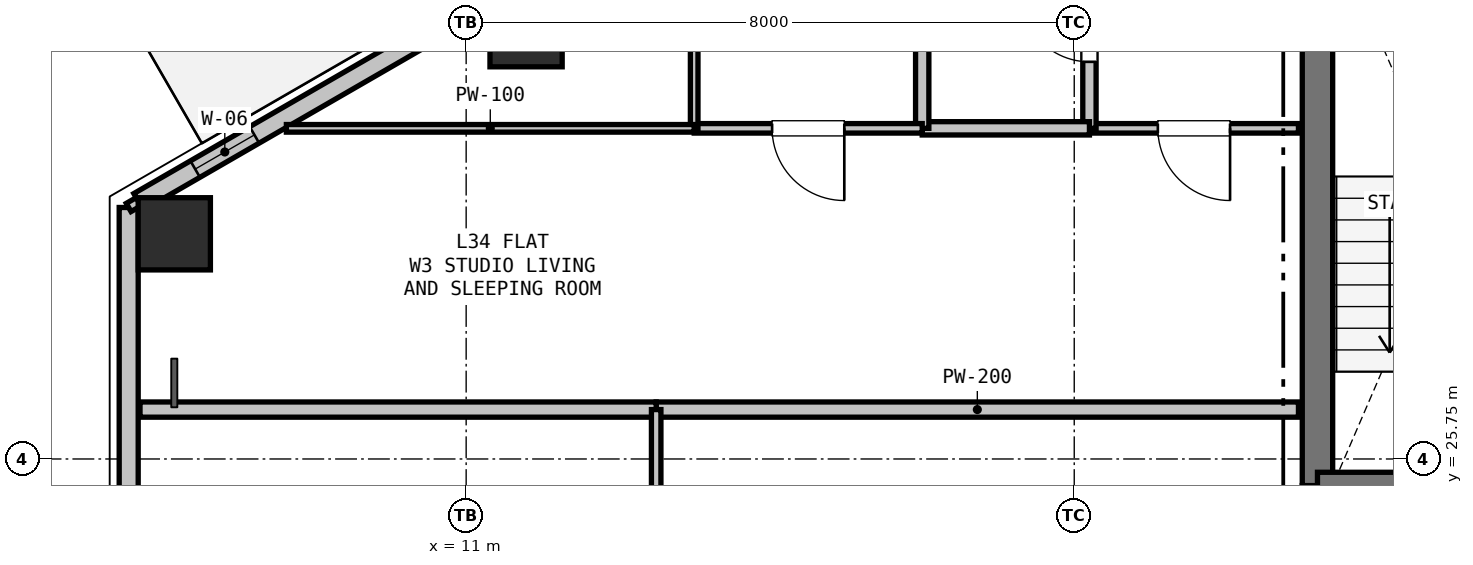
"""IFC4 building model, lengths in metres.
Left out: names, types, materials, properties, quantities, classifications, styles, units other than length and angle.
Written with IfcOpenShell. Run it as: python <this file> out.ifc"""

import sys

from ifc_helpers import new_model, si_unit, direction, frame, frame_2d, origin, origin_2d, place, context, subcontext, project, spatial, rectangle, hollow_rectangle, extrude, element, fill, save


model = new_model("IFC4")
c1 = context("Model", 3, precision=1e-05, world=origin(), true_north=direction((0.0, 1.0)))
c2 = subcontext(c1, "Body", "Model", "MODEL_VIEW")
j1 = project(units=[si_unit("LENGTHUNIT", "METRE"), si_unit("PLANEANGLEUNIT", "RADIAN")], contexts=[c1])
p1 = place(None, origin())
s1 = spatial("IfcSite", under=j1, at=p1, CompositionType="ELEMENT")
p2 = place(p1, origin())
s2 = spatial("IfcBuilding", under=s1, at=p2, CompositionType="ELEMENT")
p3 = place(p2, frame((0.0, 0.0, 124.5)))
s3 = spatial("IfcBuildingStorey", under=s2, at=p3, CompositionType="ELEMENT", Elevation=124.5)
for number, where, z_axis, x_axis in (
    (1, (7.16, 28.712, 0.0), (0.0, 0.0, 1.0), (1.0, 0.0, 0.0)),
    (2, (11.788, 31.384, 0.0), (0.0, 0.0, 1.0), (1.0, 0.0, 0.0)),
):
    element("IfcColumn", number, at=place(p3, frame(where, z_axis=z_axis, x_axis=x_axis)), inside=s3, PredefinedType="COLUMN", context=c2, shape_type="SweptSolid", body=[
        extrude(hollow_rectangle(XDim=0.95, YDim=0.95, WallThickness=0.028, at=origin_2d()), origin(), (0.0, 0.0, 1.0), 3.3),
    ])
p4 = place(p3, frame((6.56, 24.441, 0.0), z_axis=(0.0, 0.0, 1.0), x_axis=(0.0, 1.0, 0.0)))
e3 = element("IfcWall", 3, at=p4, inside=s3, PredefinedType="SOLIDWALL", context=c2, shape_type="SweptSolid", body=[
    extrude(rectangle(XDim=4.617, YDim=0.25, at=frame_2d((2.309, 0.0))), origin(), (0.0, 0.0, 1.0), 2.68),
])
p5 = place(p3, frame((6.69, 29.134, 0.0), z_axis=(0.0, 0.0, 1.0), x_axis=(0.866027848477, 0.499995765644, 0.0)))
e4 = element("IfcWall", 4, at=p5, inside=s3, PredefinedType="SOLIDWALL", context=c2, shape_type="SweptSolid", body=[
    extrude(rectangle(XDim=11.186, YDim=0.25, at=frame_2d((5.593, 0.0))), origin(), (0.0, 0.0, 1.0), 2.68),
])
p6 = place(p5, frame((9.122, 0.0, 0.0)))
e5 = element("IfcOpeningElement", 5, at=p6, cuts=e4, PredefinedType="OPENING", context=c2, shape_type="SweptSolid", body=[
    extrude(rectangle(XDim=1.0, YDim=2.1, at=frame_2d((0.5, 1.05))), frame((0.0, 0.135, 0.0), z_axis=(0.0, -1.0, 0.0), x_axis=(1.0, 0.0, 0.0)), (0.0, 0.0, 1.0), 0.27),
])
p7 = place(p5, frame((0.86, 0.0, 0.9)))
e6 = element("IfcOpeningElement", 6, at=p7, cuts=e4, PredefinedType="OPENING", context=c2, shape_type="SweptSolid", body=[
    extrude(rectangle(XDim=0.9, YDim=1.4, at=frame_2d((0.45, 0.7))), frame((0.0, 0.135, 0.0), z_axis=(0.0, -1.0, 0.0), x_axis=(1.0, 0.0, 0.0)), (0.0, 0.0, 1.0), 0.27),
])
p8 = place(p3, frame((22.2, 25.4, 0.0), z_axis=(0.0, 0.0, 1.0), x_axis=(0.0, 1.0, 0.0)))
e7 = element("IfcWall", 7, at=p8, inside=s3, PredefinedType="SHEAR", context=c2, shape_type="SweptSolid", body=[
    extrude(rectangle(XDim=7.35, YDim=0.4, at=frame_2d((3.675, 0.0))), origin(), (0.0, 0.0, 1.0), 3.06),
])
p9 = place(p3, frame((22.2, 25.4, 0.0), z_axis=(0.0, 0.0, 1.0), x_axis=(1.0, 0.0, 0.0)))
e8 = element("IfcWall", 8, at=p9, inside=s3, PredefinedType="SHEAR", context=c2, shape_type="SweptSolid", body=[
    extrude(rectangle(XDim=3.45, YDim=0.35, at=frame_2d((1.725, 0.0))), origin(), (0.0, 0.0, 1.0), 3.06),
])
p10 = place(p9, frame((1.15, 0.0, 0.0)))
e9 = element("IfcOpeningElement", 9, at=p10, cuts=e8, PredefinedType="OPENING", context=c2, shape_type="SweptSolid", body=[
    extrude(rectangle(XDim=1.15, YDim=2.15, at=frame_2d((0.575, 1.075))), frame((0.0, 0.185, 0.0), z_axis=(0.0, -1.0, 0.0), x_axis=(1.0, 0.0, 0.0)), (0.0, 0.0, 1.0), 0.37),
])
p11 = place(p3, frame((21.95, 30.1, 0.0), z_axis=(0.0, 0.0, 1.0), x_axis=(-1.0, 0.0, 0.0)))
e10 = element("IfcWall", 10, at=p11, inside=s3, PredefinedType="PARTITIONING", context=c2, shape_type="SweptSolid", body=[
    extrude(rectangle(XDim=2.75, YDim=0.125, at=frame_2d((1.375, 0.0))), origin(), (0.0, 0.0, 1.0), 2.508),
])
p12 = place(p11, frame((0.9, 0.0, 0.0)))
e11 = element("IfcOpeningElement", 11, at=p12, cuts=e10, PredefinedType="OPENING", context=c2, shape_type="SweptSolid", body=[
    extrude(rectangle(XDim=0.95, YDim=2.1, at=frame_2d((0.475, 1.05))), frame((0.0, 0.073, 0.0), z_axis=(0.0, -1.0, 0.0), x_axis=(1.0, 0.0, 0.0)), (0.0, 0.0, 1.0), 0.145),
])
p13 = place(p3, frame((19.2, 30.1, 0.0), z_axis=(0.0, 0.0, 1.0), x_axis=(0.0, 1.0, 0.0)))
e12 = element("IfcWall", 12, at=p13, inside=s3, PredefinedType="PLUMBINGWALL", context=c2, shape_type="SweptSolid", body=[
    extrude(rectangle(XDim=2.65, YDim=0.175, at=frame_2d((1.325, 0.0))), origin(), (0.0, 0.0, 1.0), 2.433),
])
p14 = place(p13, frame((0.875, 0.0, 0.0)))
e13 = element("IfcOpeningElement", 13, at=p14, cuts=e12, PredefinedType="OPENING", context=c2, shape_type="SweptSolid", body=[
    extrude(rectangle(XDim=0.9, YDim=2.1, at=frame_2d((0.45, 1.05))), frame((0.0, 0.097, 0.0), z_axis=(0.0, -1.0, 0.0), x_axis=(1.0, 0.0, 0.0)), (0.0, 0.0, 1.0), 0.195),
])
p15 = place(p3, frame((19.2, 30.1, 0.0), z_axis=(0.0, 0.0, 1.0), x_axis=(-1.0, 0.0, 0.0)))
e14 = element("IfcWall", 14, at=p15, inside=s3, PredefinedType="PLUMBINGWALL", context=c2, shape_type="SweptSolid", body=[
    extrude(rectangle(XDim=2.2, YDim=0.175, at=frame_2d((1.1, 0.0))), origin(), (0.0, 0.0, 1.0), 3.06),
])
p16 = place(p3, frame((17.0, 30.1, 0.0), z_axis=(0.0, 0.0, 1.0), x_axis=(0.0, 1.0, 0.0)))
e15 = element("IfcWall", 15, at=p16, inside=s3, PredefinedType="PLUMBINGWALL", context=c2, shape_type="SweptSolid", body=[
    extrude(rectangle(XDim=2.65, YDim=0.175, at=frame_2d((1.325, 0.0))), origin(), (0.0, 0.0, 1.0), 2.433),
])
p17 = place(p3, frame((17.0, 30.1, 0.0), z_axis=(0.0, 0.0, 1.0), x_axis=(-1.0, 0.0, 0.0)))
e16 = element("IfcWall", 16, at=p17, inside=s3, PredefinedType="PARTITIONING", context=c2, shape_type="SweptSolid", body=[
    extrude(rectangle(XDim=3.0, YDim=0.125, at=frame_2d((1.5, 0.0))), origin(), (0.0, 0.0, 1.0), 3.06),
])
p18 = place(p17, frame((1.025, 0.0, 0.0)))
e17 = element("IfcOpeningElement", 17, at=p18, cuts=e16, PredefinedType="OPENING", context=c2, shape_type="SweptSolid", body=[
    extrude(rectangle(XDim=0.95, YDim=2.1, at=frame_2d((0.475, 1.05))), frame((0.0, 0.073, 0.0), z_axis=(0.0, -1.0, 0.0), x_axis=(1.0, 0.0, 0.0)), (0.0, 0.0, 1.0), 0.145),
])
p19 = place(p3, frame((14.0, 30.1, 0.0), z_axis=(0.0, 0.0, 1.0), x_axis=(0.0, 1.0, 0.0)))
e18 = element("IfcWall", 18, at=p19, inside=s3, PredefinedType="PARTITIONING", context=c2, shape_type="SweptSolid", body=[
    extrude(rectangle(XDim=3.082, YDim=0.1, at=frame_2d((1.541, 0.0))), origin(), (0.0, 0.0, 1.0), 2.365),
])
p20 = place(p3, frame((8.635, 30.1, 0.0), z_axis=(0.0, 0.0, 1.0), x_axis=(1.0, 0.0, 0.0)))
e19 = element("IfcWall", 19, at=p20, inside=s3, PredefinedType="PARTITIONING", context=c2, shape_type="SweptSolid", body=[
    extrude(rectangle(XDim=5.365, YDim=0.1, at=frame_2d((2.683, 0.0))), origin(), (0.0, 0.0, 1.0), 2.725),
])
p21 = place(p3, frame((21.95, 26.4, 0.0), z_axis=(0.0, 0.0, 1.0), x_axis=(-1.0, 0.0, 0.0)))
e20 = element("IfcWall", 20, at=p21, inside=s3, PredefinedType="PARTITIONING", context=c2, shape_type="SweptSolid", body=[
    extrude(rectangle(XDim=8.45, YDim=0.2, at=frame_2d((4.225, 0.0))), origin(), (0.0, 0.0, 1.0), 2.508),
])
p22 = place(p3, frame((13.5, 26.4, 0.0), z_axis=(0.0, 0.0, 1.0), x_axis=(-1.0, 0.0, 0.0)))
e21 = element("IfcWall", 21, at=p22, inside=s3, PredefinedType="PARTITIONING", context=c2, shape_type="SweptSolid", body=[
    extrude(rectangle(XDim=6.791, YDim=0.2, at=frame_2d((3.396, 0.0))), origin(), (0.0, 0.0, 1.0), 2.725),
])
p23 = place(p3, frame((6.56, 29.059, 0.0), z_axis=(0.0, 0.0, 1.0), x_axis=(0.866131372301, 0.499816412211, 0.0)))
e22 = element("IfcWall", 22, at=p23, inside=s3, PredefinedType="PARTITIONING", context=c2, shape_type="SweptSolid", body=[
    extrude(rectangle(XDim=0.15, YDim=0.125, at=frame_2d((0.075, 0.0))), origin(), (0.0, 0.0, 1.0), 3.06),
])
p24 = place(p3, frame((13.5, 23.4, 0.0), z_axis=(0.0, 0.0, 1.0), x_axis=(0.0, 1.0, 0.0)))
e23 = element("IfcWall", 23, at=p24, inside=s3, PredefinedType="PARTITIONING", context=c2, shape_type="SweptSolid", body=[
    extrude(rectangle(XDim=3.0, YDim=0.125, at=frame_2d((1.5, 0.0))), origin(), (0.0, 0.0, 1.0), 3.06),
])
p25 = place(p24, frame((1.025, 0.0, 0.0)))
e24 = element("IfcOpeningElement", 24, at=p25, cuts=e23, PredefinedType="OPENING", context=c2, shape_type="SweptSolid", body=[
    extrude(rectangle(XDim=0.95, YDim=2.1, at=frame_2d((0.475, 1.05))), frame((0.0, 0.073, 0.0), z_axis=(0.0, -1.0, 0.0), x_axis=(1.0, 0.0, 0.0)), (0.0, 0.0, 1.0), 0.145),
])
p26 = place(p7, origin())
e25 = element("IfcWindow", 25, at=p26, inside=s3, PartitioningType="SINGLE_PANEL", PredefinedType="WINDOW", context=c2, shape_type="SweptSolid", body=[
    extrude(rectangle(XDim=0.9, YDim=1.4, at=frame_2d((0.45, 0.7))), frame((0.0, 0.03, 0.0), z_axis=(0.0, -1.0, 0.0), x_axis=(1.0, 0.0, 0.0)), (0.0, 0.0, 1.0), 0.06),
])
fill(e6, e25)
p27 = place(p14, origin())
e26 = element("IfcDoor", 26, at=p27, inside=s3, OperationType="SINGLE_SWING_RIGHT", PredefinedType="DOOR", context=c2, shape_type="SweptSolid", body=[
    extrude(rectangle(XDim=0.9, YDim=2.1, at=frame_2d((0.45, 1.05))), frame((0.0, 0.025, 0.0), z_axis=(0.0, -1.0, 0.0), x_axis=(1.0, 0.0, 0.0)), (0.0, 0.0, 1.0), 0.05),
])
fill(e13, e26)
p28 = place(p12, origin())
e27 = element("IfcDoor", 27, at=p28, inside=s3, OperationType="SINGLE_SWING_LEFT", PredefinedType="DOOR", context=c2, shape_type="SweptSolid", body=[
    extrude(rectangle(XDim=0.95, YDim=2.1, at=frame_2d((0.475, 1.05))), frame((0.0, 0.025, 0.0), z_axis=(0.0, -1.0, 0.0), x_axis=(1.0, 0.0, 0.0)), (0.0, 0.0, 1.0), 0.05),
])
fill(e11, e27)
p29 = place(p18, origin())
e28 = element("IfcDoor", 28, at=p29, inside=s3, OperationType="SINGLE_SWING_LEFT", PredefinedType="DOOR", context=c2, shape_type="SweptSolid", body=[
    extrude(rectangle(XDim=0.95, YDim=2.1, at=frame_2d((0.475, 1.05))), frame((0.0, 0.025, 0.0), z_axis=(0.0, -1.0, 0.0), x_axis=(1.0, 0.0, 0.0)), (0.0, 0.0, 1.0), 0.05),
])
fill(e17, e28)
save(model, sys.argv[1])
